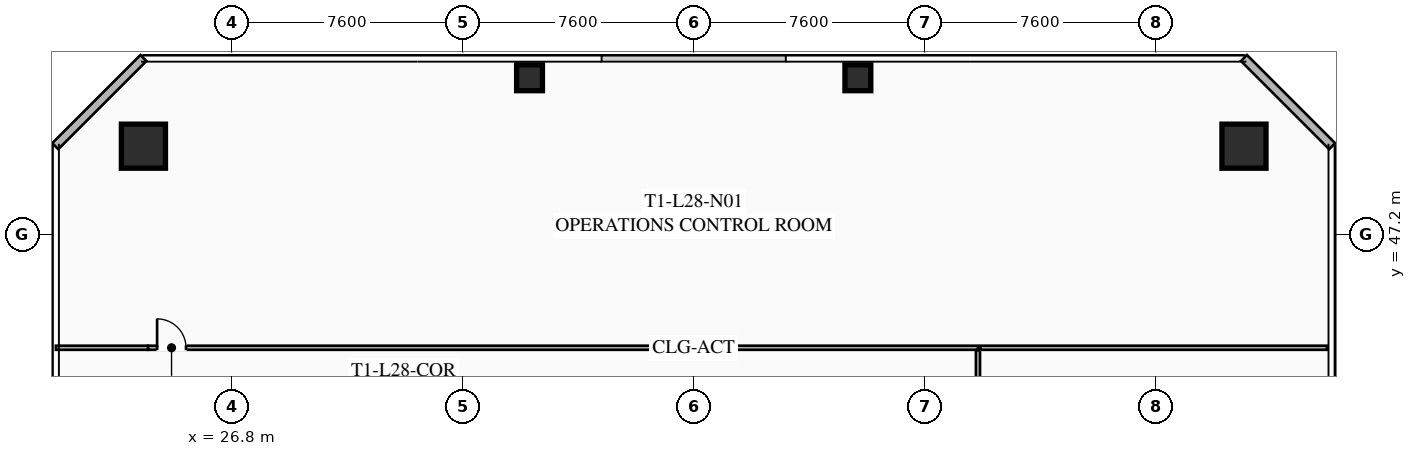
"""IFC4 building model, lengths in metres.
Left out: names, types, materials, properties, quantities, classifications, styles, units other than length and angle.
Written with IfcOpenShell. Run it as: python <this file> out.ifc"""

import sys

from ifc_helpers import new_model, si_unit, direction, frame, frame_2d, origin, origin_2d, place, context, subcontext, project, spatial, rectangle, hollow_rectangle, extrude, element, fill, save


model = new_model("IFC4")
c1 = context("Model", 3, precision=1e-05, world=origin(), true_north=direction((0.0, 1.0)))
c2 = subcontext(c1, "Body", "Model", "MODEL_VIEW")
j1 = project(units=[si_unit("LENGTHUNIT", "METRE"), si_unit("PLANEANGLEUNIT", "RADIAN")], contexts=[c1])
p1 = place(None, origin())
s1 = spatial("IfcSite", under=j1, at=p1, CompositionType="ELEMENT")
p2 = place(p1, origin())
s2 = spatial("IfcBuilding", under=s1, at=p2, CompositionType="ELEMENT")
p3 = place(p2, frame((0.0, 0.0, 106.25)))
s3 = spatial("IfcBuildingStorey", under=s2, at=p3, CompositionType="ELEMENT", Elevation=106.25)
for number, where, z_axis, x_axis in (
    (1, (60.1, 50.1, 0.0), (0.0, 0.0, 1.0), (1.0, 0.0, 0.0)),
    (2, (23.9, 50.1, 0.0), (0.0, 0.0, 1.0), (1.0, 0.0, 0.0)),
):
    element("IfcColumn", number, at=place(p3, frame(where, z_axis=z_axis, x_axis=x_axis)), inside=s3, PredefinedType="COLUMN", context=c2, shape_type="SweptSolid", body=[
        extrude(hollow_rectangle(XDim=1.45, YDim=1.45, WallThickness=0.055, at=origin_2d()), origin(), (0.0, 0.0, 1.0), 3.25),
    ])
for number, where, z_axis, x_axis in (
    (3, (47.4, 52.35, 0.0), (0.0, 0.0, 1.0), (1.0, 0.0, 0.0)),
    (4, (36.6, 52.35, 0.0), (0.0, 0.0, 1.0), (1.0, 0.0, 0.0)),
):
    element("IfcColumn", number, at=place(p3, frame(where, z_axis=z_axis, x_axis=x_axis)), inside=s3, PredefinedType="COLUMN", context=c2, shape_type="SweptSolid", body=[
        extrude(hollow_rectangle(XDim=0.85, YDim=0.85, WallThickness=0.035, at=origin_2d()), origin(), (0.0, 0.0, 1.0), 3.25),
    ])
for number, where, z_axis, x_axis in (
    (5, (21.0, 50.1, 0.0), (0.0, 0.0, 1.0), (0.707, 0.707, 0.0)),
    (6, (60.1, 53.0, 0.0), (0.0, 0.0, 1.0), (0.707, -0.707, 0.0)),
):
    element("IfcWall", number, at=place(p3, frame(where, z_axis=z_axis, x_axis=x_axis)), inside=s3, PredefinedType="SOLIDWALL", context=c2, shape_type="SweptSolid", body=[
        extrude(rectangle(XDim=4.101, YDim=0.28, at=frame_2d((2.051, 0.0))), origin(), (0.0, 0.0, 1.0), 3.25),
    ])
p4 = place(p3, frame((24.05, 43.47, 0.0), z_axis=(0.0, 0.0, 1.0), x_axis=(1.0, 0.0, 0.0)))
e7 = element("IfcWall", 7, at=p4, inside=s3, PredefinedType="PARTITIONING", context=c2, shape_type="SweptSolid", body=[
    extrude(rectangle(XDim=27.3, YDim=0.135, at=frame_2d((13.65, 0.0))), origin(), (0.0, 0.0, 1.0), 2.393),
])
p5 = place(p4, frame((0.3, 0.0, 0.0)))
e8 = element("IfcOpeningElement", 8, at=p5, cuts=e7, PredefinedType="OPENING", context=c2, shape_type="SweptSolid", body=[
    extrude(rectangle(XDim=0.95, YDim=2.05, at=frame_2d((0.475, 1.025))), frame((0.0, 0.077, 0.0), z_axis=(0.0, -1.0, 0.0), x_axis=(1.0, 0.0, 0.0)), (0.0, 0.0, 1.0), 0.155),
])
p6 = place(p3, frame((21.02, 43.47, 0.0), z_axis=(0.0, 0.0, 1.0), x_axis=(1.0, 0.0, 0.0)))
e9 = element("IfcWall", 9, at=p6, inside=s3, PredefinedType="PARTITIONING", context=c2, shape_type="SweptSolid", body=[
    extrude(rectangle(XDim=3.03, YDim=0.135, at=frame_2d((1.515, 0.0))), origin(), (0.0, 0.0, 1.0), 2.393),
])
p7 = place(p3, frame((51.35, 43.39, 0.0), z_axis=(0.0, 0.0, 1.0), x_axis=(0.0, -1.0, 0.0)))
e10 = element("IfcWall", 10, at=p7, inside=s3, PredefinedType="PARTITIONING", context=c2, shape_type="SweptSolid", body=[
    extrude(rectangle(XDim=21.96, YDim=0.135, at=frame_2d((10.98, 0.0))), origin(), (0.0, 0.0, 1.0), 2.393),
])
p8 = place(p7, frame((10.631, 0.0, 0.0)))
e11 = element("IfcOpeningElement", 11, at=p8, cuts=e10, PredefinedType="OPENING", context=c2, shape_type="SweptSolid", body=[
    extrude(rectangle(XDim=0.95, YDim=2.05, at=frame_2d((0.475, 1.025))), frame((0.0, 0.077, 0.0), z_axis=(0.0, -1.0, 0.0), x_axis=(1.0, 0.0, 0.0)), (0.0, 0.0, 1.0), 0.155),
])
p9 = place(p3, frame((62.83, 43.47, 0.0), z_axis=(0.0, 0.0, 1.0), x_axis=(-1.0, 0.0, 0.0)))
e12 = element("IfcWall", 12, at=p9, inside=s3, PredefinedType="PARTITIONING", context=c2, shape_type="SweptSolid", body=[
    extrude(rectangle(XDim=11.4, YDim=0.135, at=frame_2d((5.7, 0.0))), origin(), (0.0, 0.0, 1.0), 2.393),
])
p10 = place(p5, origin())
e13 = element("IfcDoor", 13, at=p10, inside=s3, OperationType="SINGLE_SWING_LEFT", PredefinedType="DOOR", context=c2, shape_type="SweptSolid", body=[
    extrude(rectangle(XDim=0.95, YDim=2.05, at=frame_2d((0.475, 1.025))), frame((0.0, 0.025, 0.0), z_axis=(0.0, -1.0, 0.0), x_axis=(1.0, 0.0, 0.0)), (0.0, 0.0, 1.0), 0.05),
])
fill(e8, e13)
save(model, sys.argv[1])
